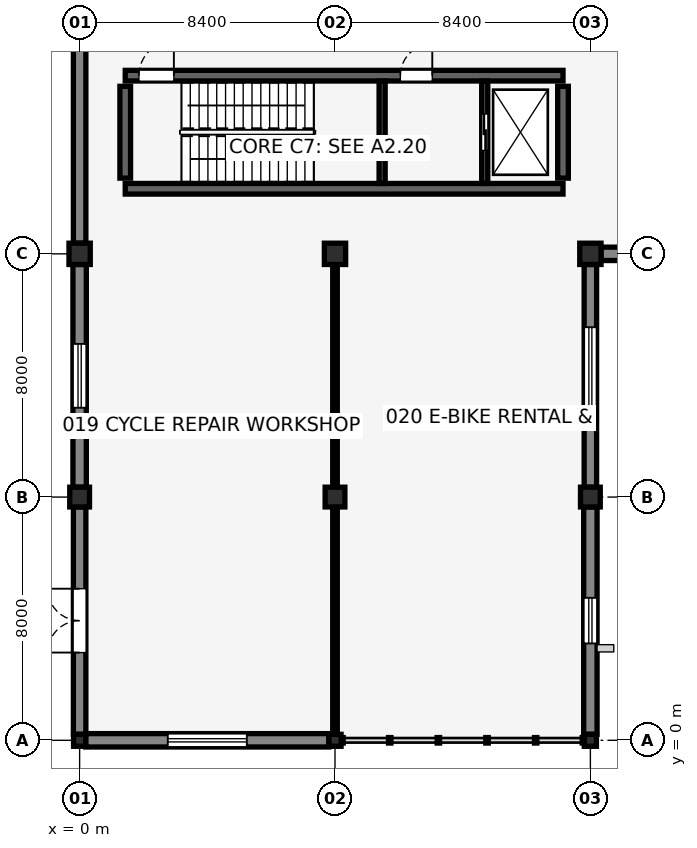
"""IFC4 building model, lengths in metres.
Left out: names, types, materials, properties, quantities, classifications, styles, units other than length and angle.
Written with IfcOpenShell. Run it as: python <this file> out.ifc"""

import sys

from ifc_helpers import new_model, si_unit, direction, frame, frame_2d, origin, origin_with_axes, origin_2d, place, context, subcontext, project, spatial, rectangle, circle, i_section, extrude, element, fill, save


model = new_model("IFC4")
c1 = context("Model", 3, precision=1e-05, world=origin(), true_north=direction((0.0, 1.0)))
c2 = subcontext(c1, "Body", "Model", "MODEL_VIEW")
j1 = project(units=[si_unit("LENGTHUNIT", "METRE"), si_unit("PLANEANGLEUNIT", "RADIAN")], contexts=[c1])
p1 = place(None, origin())
s1 = spatial("IfcSite", under=j1, at=p1, CompositionType="ELEMENT")
p2 = place(p1, origin())
s2 = spatial("IfcBuilding", under=s1, at=p2, CompositionType="ELEMENT")
p3 = place(p2, origin())
s3 = spatial("IfcBuildingStorey", under=s2, at=p3, CompositionType="ELEMENT", Elevation=0.0)
p4 = place(p3, frame((1.5, 18.14, 0.0), z_axis=(0.0, 0.0, 1.0), x_axis=(1.0, 0.0, 0.0)))
e1 = element("IfcWall", 1, at=p4, inside=s3, PredefinedType="SHEAR", context=c2, shape_type="SweptSolid", body=[
    extrude(rectangle(XDim=14.4, YDim=0.35, at=frame_2d((7.2, 0.0))), origin(), (0.0, 0.0, 1.0), 5.15),
])
p5 = place(p3, frame((1.5, 21.86, 0.0), z_axis=(0.0, 0.0, 1.0), x_axis=(1.0, 0.0, 0.0)))
e2 = element("IfcWall", 2, at=p5, inside=s3, PredefinedType="SHEAR", context=c2, shape_type="SweptSolid", body=[
    extrude(rectangle(XDim=14.4, YDim=0.35, at=frame_2d((7.2, 0.0))), origin(), (0.0, 0.0, 1.0), 5.15),
])
p6 = place(p5, frame((0.45, 0.0, 0.0), z_axis=(0.0, 0.0, 1.0), x_axis=(1.0, 0.0, 0.0)))
e3 = element("IfcOpeningElement", 3, at=p6, cuts=e2, PredefinedType="OPENING", context=c2, shape_type="SweptSolid", body=[
    extrude(rectangle(XDim=1.15, YDim=2.15, at=frame_2d((0.575, 1.075))), frame((0.0, 0.185, 0.0), z_axis=(0.0, -1.0, 0.0), x_axis=(1.0, 0.0, 0.0)), (0.0, 0.0, 1.0), 0.37),
])
p7 = place(p5, frame((9.05, 0.0, 0.0), z_axis=(0.0, 0.0, 1.0), x_axis=(1.0, 0.0, 0.0)))
e4 = element("IfcOpeningElement", 4, at=p7, cuts=e2, PredefinedType="OPENING", context=c2, shape_type="SweptSolid", body=[
    extrude(rectangle(XDim=1.05, YDim=2.15, at=frame_2d((0.525, 1.075))), frame((0.0, 0.185, 0.0), z_axis=(0.0, -1.0, 0.0), x_axis=(1.0, 0.0, 0.0)), (0.0, 0.0, 1.0), 0.37),
])
for number, where, z_axis, x_axis in (
    (5, (1.5, 18.49, 0.0), (0.0, 0.0, 1.0), (0.0, 1.0, 0.0)),
    (6, (15.9, 18.49, 0.0), (0.0, 0.0, 1.0), (0.0, 1.0, 0.0)),
):
    element("IfcWall", number, at=place(p3, frame(where, z_axis=z_axis, x_axis=x_axis)), inside=s3, PredefinedType="SHEAR", context=c2, shape_type="SweptSolid", body=[
        extrude(rectangle(XDim=3.02, YDim=0.35, at=frame_2d((1.51, 0.0))), origin(), (0.0, 0.0, 1.0), 5.15),
    ])
p8 = place(p3, origin_with_axes())
e7 = element("IfcColumn", 7, at=p8, inside=s3, PredefinedType="COLUMN", context=c2, shape_type="SweptSolid", body=[
    extrude(i_section(OverallWidth=0.399, OverallDepth=0.394, WebThickness=0.023, FlangeThickness=0.037, FilletRadius=0.015, at=origin_2d()), origin(), (0.0, 0.0, 1.0), 5.15),
])
p9 = place(p3, frame((0.0, 8.0, 0.0), z_axis=(0.0, 0.0, 1.0), x_axis=(1.0, 0.0, 0.0)))
e8 = element("IfcColumn", 8, at=p9, inside=s3, PredefinedType="COLUMN", context=c2, shape_type="SweptSolid", body=[
    extrude(circle(Radius=0.325, at=origin_2d()), origin(), (0.0, 0.0, 1.0), 5.15),
])
p10 = place(p3, frame((0.0, 16.0, 0.0), z_axis=(0.0, 0.0, 1.0), x_axis=(1.0, 0.0, 0.0)))
e9 = element("IfcColumn", 9, at=p10, inside=s3, PredefinedType="COLUMN", context=c2, shape_type="SweptSolid", body=[
    extrude(rectangle(XDim=0.7, YDim=0.7, at=origin_2d()), origin(), (0.0, 0.0, 1.0), 5.15),
])
p11 = place(p3, frame((8.4, 0.0, 0.0), z_axis=(0.0, 0.0, 1.0), x_axis=(1.0, 0.0, 0.0)))
e10 = element("IfcColumn", 10, at=p11, inside=s3, PredefinedType="COLUMN", context=c2, shape_type="SweptSolid", body=[
    extrude(i_section(OverallWidth=0.399, OverallDepth=0.394, WebThickness=0.023, FlangeThickness=0.037, FilletRadius=0.015, at=origin_2d()), origin(), (0.0, 0.0, 1.0), 5.15),
])
p12 = place(p3, frame((8.4, 8.0, 0.0), z_axis=(0.0, 0.0, 1.0), x_axis=(1.0, 0.0, 0.0)))
e11 = element("IfcColumn", 11, at=p12, inside=s3, PredefinedType="COLUMN", context=c2, shape_type="SweptSolid", body=[
    extrude(circle(Radius=0.325, at=origin_2d()), origin(), (0.0, 0.0, 1.0), 5.15),
])
p13 = place(p3, frame((8.4, 16.0, 0.0), z_axis=(0.0, 0.0, 1.0), x_axis=(1.0, 0.0, 0.0)))
e12 = element("IfcColumn", 12, at=p13, inside=s3, PredefinedType="COLUMN", context=c2, shape_type="SweptSolid", body=[
    extrude(rectangle(XDim=0.7, YDim=0.7, at=origin_2d()), origin(), (0.0, 0.0, 1.0), 5.15),
])
p14 = place(p3, frame((16.8, 0.0, 0.0), z_axis=(0.0, 0.0, 1.0), x_axis=(1.0, 0.0, 0.0)))
e13 = element("IfcColumn", 13, at=p14, inside=s3, PredefinedType="COLUMN", context=c2, shape_type="SweptSolid", body=[
    extrude(i_section(OverallWidth=0.399, OverallDepth=0.394, WebThickness=0.023, FlangeThickness=0.037, FilletRadius=0.015, at=origin_2d()), origin(), (0.0, 0.0, 1.0), 5.15),
])
p15 = place(p3, frame((16.8, 8.0, 0.0), z_axis=(0.0, 0.0, 1.0), x_axis=(1.0, 0.0, 0.0)))
e14 = element("IfcColumn", 14, at=p15, inside=s3, PredefinedType="COLUMN", context=c2, shape_type="SweptSolid", body=[
    extrude(circle(Radius=0.325, at=origin_2d()), origin(), (0.0, 0.0, 1.0), 5.15),
])
p16 = place(p3, frame((16.8, 16.0, 0.0), z_axis=(0.0, 0.0, 1.0), x_axis=(1.0, 0.0, 0.0)))
e15 = element("IfcColumn", 15, at=p16, inside=s3, PredefinedType="COLUMN", context=c2, shape_type="SweptSolid", body=[
    extrude(rectangle(XDim=0.7, YDim=0.7, at=origin_2d()), origin(), (0.0, 0.0, 1.0), 5.15),
])
p17 = place(p3, frame((0.0, 16.35, 0.0), z_axis=(0.0, 0.0, 1.0), x_axis=(0.0, 1.0, 0.0)))
e16 = element("IfcWall", 16, at=p17, inside=s3, PredefinedType="SOLIDWALL", context=c2, shape_type="SweptSolid", body=[
    extrude(rectangle(XDim=7.3, YDim=0.41, at=frame_2d((3.65, 0.0))), origin(), (0.0, 0.0, 1.0), 4.85),
])
p18 = place(p3, frame((17.15, 16.0, 0.0), z_axis=(0.0, 0.0, 1.0), x_axis=(1.0, 0.0, 0.0)))
e17 = element("IfcWall", 17, at=p18, inside=s3, PredefinedType="SOLIDWALL", context=c2, shape_type="SweptSolid", body=[
    extrude(rectangle(XDim=7.725, YDim=0.44, at=frame_2d((3.863, 0.0))), origin(), (0.0, 0.0, 1.0), 4.74),
])
p19 = place(p18, frame((4.962, 0.0, 0.0), z_axis=(0.0, 0.0, 1.0), x_axis=(-1.0, 0.0, 0.0)))
e18 = element("IfcOpeningElement", 18, at=p19, cuts=e17, PredefinedType="OPENING", context=c2, shape_type="SweptSolid", body=[
    extrude(rectangle(XDim=2.2, YDim=2.4, at=frame_2d((1.1, 1.2))), frame((0.0, 0.23, 0.0), z_axis=(0.0, -1.0, 0.0), x_axis=(1.0, 0.0, 0.0)), (0.0, 0.0, 1.0), 0.46),
])
p20 = place(p3, frame((16.8, 0.197, 0.0), z_axis=(0.0, 0.0, 1.0), x_axis=(0.0, 1.0, 0.0)))
e19 = element("IfcWall", 19, at=p20, inside=s3, PredefinedType="SOLIDWALL", context=c2, shape_type="SweptSolid", body=[
    extrude(rectangle(XDim=7.478, YDim=0.44, at=frame_2d((3.739, 0.0))), origin(), (0.0, 0.0, 1.0), 4.747),
])
p21 = place(p20, frame((2.989, 0.0, 0.9), z_axis=(0.0, 0.0, 1.0), x_axis=(1.0, 0.0, 0.0)))
e20 = element("IfcOpeningElement", 20, at=p21, cuts=e19, PredefinedType="OPENING", context=c2, shape_type="SweptSolid", body=[
    extrude(rectangle(XDim=1.5, YDim=1.4, at=frame_2d((0.75, 0.7))), frame((0.0, 0.23, 0.0), z_axis=(0.0, -1.0, 0.0), x_axis=(1.0, 0.0, 0.0)), (0.0, 0.0, 1.0), 0.46),
])
p22 = place(p3, frame((16.8, 8.325, 0.0), z_axis=(0.0, 0.0, 1.0), x_axis=(0.0, 1.0, 0.0)))
e21 = element("IfcWall", 21, at=p22, inside=s3, PredefinedType="SOLIDWALL", context=c2, shape_type="SweptSolid", body=[
    extrude(rectangle(XDim=7.325, YDim=0.41, at=frame_2d((3.663, 0.0))), origin(), (0.0, 0.0, 1.0), 4.747),
])
p23 = place(p22, frame((2.062, 0.0, 1.55), z_axis=(0.0, 0.0, 1.0), x_axis=(1.0, 0.0, 0.0)))
e22 = element("IfcOpeningElement", 22, at=p23, cuts=e21, PredefinedType="OPENING", context=c2, shape_type="SweptSolid", body=[
    extrude(rectangle(XDim=3.2, YDim=0.9, at=frame_2d((1.6, 0.45))), frame((0.0, 0.215, 0.0), z_axis=(0.0, -1.0, 0.0), x_axis=(1.0, 0.0, 0.0)), (0.0, 0.0, 1.0), 0.43),
])
p24 = place(p3, frame((0.199, 0.0, 0.0), z_axis=(0.0, 0.0, 1.0), x_axis=(1.0, 0.0, 0.0)))
e23 = element("IfcWall", 23, at=p24, inside=s3, PredefinedType="SOLIDWALL", context=c2, shape_type="SweptSolid", body=[
    extrude(rectangle(XDim=8.001, YDim=0.44, at=frame_2d((4.0, 0.0))), origin(), (0.0, 0.0, 1.0), 4.74),
])
p25 = place(p24, frame((2.7, 0.0, 1.55), z_axis=(0.0, 0.0, 1.0), x_axis=(1.0, 0.0, 0.0)))
e24 = element("IfcOpeningElement", 24, at=p25, cuts=e23, PredefinedType="OPENING", context=c2, shape_type="SweptSolid", body=[
    extrude(rectangle(XDim=2.6, YDim=0.85, at=frame_2d((1.3, 0.425))), frame((0.0, 0.23, 0.0), z_axis=(0.0, -1.0, 0.0), x_axis=(1.0, 0.0, 0.0)), (0.0, 0.0, 1.0), 0.46),
])
p26 = place(p3, frame((0.0, 0.197, 0.0), z_axis=(0.0, 0.0, 1.0), x_axis=(0.0, 1.0, 0.0)))
e25 = element("IfcWall", 25, at=p26, inside=s3, PredefinedType="SOLIDWALL", context=c2, shape_type="SweptSolid", body=[
    extrude(rectangle(XDim=7.478, YDim=0.41, at=frame_2d((3.739, 0.0))), origin(), (0.0, 0.0, 1.0), 4.747),
])
p27 = place(p26, frame((2.689, 0.0, 0.0), z_axis=(0.0, 0.0, 1.0), x_axis=(1.0, 0.0, 0.0)))
e26 = element("IfcOpeningElement", 26, at=p27, cuts=e25, PredefinedType="OPENING", context=c2, shape_type="SweptSolid", body=[
    extrude(rectangle(XDim=2.1, YDim=2.45, at=frame_2d((1.05, 1.225))), frame((0.0, 0.215, 0.0), z_axis=(0.0, -1.0, 0.0), x_axis=(1.0, 0.0, 0.0)), (0.0, 0.0, 1.0), 0.43),
])
p28 = place(p3, frame((0.0, 8.325, 0.0), z_axis=(0.0, 0.0, 1.0), x_axis=(0.0, 1.0, 0.0)))
e27 = element("IfcWall", 27, at=p28, inside=s3, PredefinedType="SOLIDWALL", context=c2, shape_type="SweptSolid", body=[
    extrude(rectangle(XDim=7.325, YDim=0.44, at=frame_2d((3.663, 0.0))), origin(), (0.0, 0.0, 1.0), 4.747),
])
p29 = place(p28, frame((2.613, 0.0, 1.55), z_axis=(0.0, 0.0, 1.0), x_axis=(1.0, 0.0, 0.0)))
e28 = element("IfcOpeningElement", 28, at=p29, cuts=e27, PredefinedType="OPENING", context=c2, shape_type="SweptSolid", body=[
    extrude(rectangle(XDim=2.1, YDim=0.8, at=frame_2d((1.05, 0.4))), frame((0.0, 0.23, 0.0), z_axis=(0.0, -1.0, 0.0), x_axis=(1.0, 0.0, 0.0)), (0.0, 0.0, 1.0), 0.46),
])
p30 = place(p3, frame((9.95, 18.315, 0.0), z_axis=(0.0, 0.0, 1.0), x_axis=(0.0, 1.0, 0.0)))
e29 = element("IfcWall", 29, at=p30, inside=s3, PredefinedType="SHEAR", context=c2, shape_type="SweptSolid", body=[
    extrude(rectangle(XDim=3.37, YDim=0.2, at=frame_2d((1.685, 0.0))), origin(), (0.0, 0.0, 1.0), 5.15),
])
p31 = place(p3, frame((13.325, 18.315, 0.0), z_axis=(0.0, 0.0, 1.0), x_axis=(0.0, 1.0, 0.0)))
e30 = element("IfcWall", 30, at=p31, inside=s3, PredefinedType="SHEAR", context=c2, shape_type="SweptSolid", body=[
    extrude(rectangle(XDim=3.37, YDim=0.2, at=frame_2d((1.685, 0.0))), origin(), (0.0, 0.0, 1.0), 5.15),
])
p32 = place(p31, frame((1.085, 0.0, 0.0), z_axis=(0.0, 0.0, 1.0), x_axis=(1.0, 0.0, 0.0)))
e31 = element("IfcOpeningElement", 31, at=p32, cuts=e30, PredefinedType="OPENING", context=c2, shape_type="SweptSolid", body=[
    extrude(rectangle(XDim=1.2, YDim=2.2, at=frame_2d((0.6, 1.1))), frame((0.0, 0.11, 0.0), z_axis=(0.0, -1.0, 0.0), x_axis=(1.0, 0.0, 0.0)), (0.0, 0.0, 1.0), 0.22),
])
p33 = place(p3, frame((8.4, 0.187, 0.0), z_axis=(0.0, 0.0, 1.0), x_axis=(0.0, 1.0, 0.0)))
e32 = element("IfcWall", 32, at=p33, inside=s3, PredefinedType="PARTITIONING", context=c2, shape_type="SweptSolid", body=[
    extrude(rectangle(XDim=7.498, YDim=0.15, at=frame_2d((3.749, 0.0))), origin(), (0.0, 0.0, 1.0), 4.542),
])
p34 = place(p3, frame((8.4, 8.315, 0.0), z_axis=(0.0, 0.0, 1.0), x_axis=(0.0, 1.0, 0.0)))
e33 = element("IfcWall", 33, at=p34, inside=s3, PredefinedType="PARTITIONING", context=c2, shape_type="SweptSolid", body=[
    extrude(rectangle(XDim=7.345, YDim=0.15, at=frame_2d((3.672, 0.0))), origin(), (0.0, 0.0, 1.0), 4.542),
])
p35 = place(p21, origin())
e34 = element("IfcWindow", 34, at=p35, inside=s3, PartitioningType="SINGLE_PANEL", PredefinedType="WINDOW", context=c2, shape_type="SweptSolid", body=[
    extrude(rectangle(XDim=1.5, YDim=1.4, at=frame_2d((0.75, 0.7))), frame((0.0, 0.03, 0.0), z_axis=(0.0, -1.0, 0.0), x_axis=(1.0, 0.0, 0.0)), (0.0, 0.0, 1.0), 0.06),
])
fill(e20, e34)
p36 = place(p23, origin())
e35 = element("IfcWindow", 35, at=p36, inside=s3, PartitioningType="TRIPLE_PANEL_HORIZONTAL", PredefinedType="WINDOW", context=c2, shape_type="SweptSolid", body=[
    extrude(rectangle(XDim=3.2, YDim=0.9, at=frame_2d((1.6, 0.45))), frame((0.0, 0.03, 0.0), z_axis=(0.0, -1.0, 0.0), x_axis=(1.0, 0.0, 0.0)), (0.0, 0.0, 1.0), 0.06),
])
fill(e22, e35)
p37 = place(p25, origin())
e36 = element("IfcWindow", 36, at=p37, inside=s3, PartitioningType="DOUBLE_PANEL_HORIZONTAL", PredefinedType="WINDOW", context=c2, shape_type="SweptSolid", body=[
    extrude(rectangle(XDim=2.6, YDim=0.85, at=frame_2d((1.3, 0.425))), frame((0.0, 0.03, 0.0), z_axis=(0.0, -1.0, 0.0), x_axis=(1.0, 0.0, 0.0)), (0.0, 0.0, 1.0), 0.06),
])
fill(e24, e36)
p38 = place(p27, origin())
e37 = element("IfcDoor", 37, at=p38, inside=s3, OperationType="DOUBLE_DOOR_SINGLE_SWING", PredefinedType="DOOR", context=c2, shape_type="SweptSolid", body=[
    extrude(rectangle(XDim=2.1, YDim=2.45, at=frame_2d((1.05, 1.225))), frame((0.0, 0.025, 0.0), z_axis=(0.0, -1.0, 0.0), x_axis=(1.0, 0.0, 0.0)), (0.0, 0.0, 1.0), 0.05),
])
fill(e26, e37)
p39 = place(p29, origin())
e38 = element("IfcWindow", 38, at=p39, inside=s3, PartitioningType="DOUBLE_PANEL_HORIZONTAL", PredefinedType="WINDOW", context=c2, shape_type="SweptSolid", body=[
    extrude(rectangle(XDim=2.1, YDim=0.8, at=frame_2d((1.05, 0.4))), frame((0.0, 0.03, 0.0), z_axis=(0.0, -1.0, 0.0), x_axis=(1.0, 0.0, 0.0)), (0.0, 0.0, 1.0), 0.06),
])
fill(e28, e38)
p40 = place(p6, origin())
e39 = element("IfcDoor", 39, at=p40, inside=s3, OperationType="SINGLE_SWING_RIGHT", PredefinedType="DOOR", context=c2, shape_type="SweptSolid", body=[
    extrude(rectangle(XDim=1.15, YDim=2.15, at=frame_2d((0.575, 1.075))), frame((0.0, 0.025, 0.0), z_axis=(0.0, -1.0, 0.0), x_axis=(1.0, 0.0, 0.0)), (0.0, 0.0, 1.0), 0.05),
])
fill(e3, e39)
p41 = place(p7, origin())
e40 = element("IfcDoor", 40, at=p41, inside=s3, OperationType="SINGLE_SWING_RIGHT", PredefinedType="DOOR", context=c2, shape_type="SweptSolid", body=[
    extrude(rectangle(XDim=1.05, YDim=2.15, at=frame_2d((0.525, 1.075))), frame((0.0, 0.025, 0.0), z_axis=(0.0, -1.0, 0.0), x_axis=(1.0, 0.0, 0.0)), (0.0, 0.0, 1.0), 0.05),
])
fill(e4, e40)
p42 = place(p32, origin())
e41 = element("IfcDoor", 41, at=p42, inside=s3, OperationType="DOUBLE_DOOR_SLIDING", PredefinedType="DOOR", context=c2, shape_type="SweptSolid", body=[
    extrude(rectangle(XDim=1.2, YDim=2.2, at=frame_2d((0.6, 1.1))), frame((0.0, 0.025, 0.0), z_axis=(0.0, -1.0, 0.0), x_axis=(1.0, 0.0, 0.0)), (0.0, 0.0, 1.0), 0.05),
])
fill(e31, e41)
save(model, sys.argv[1])
